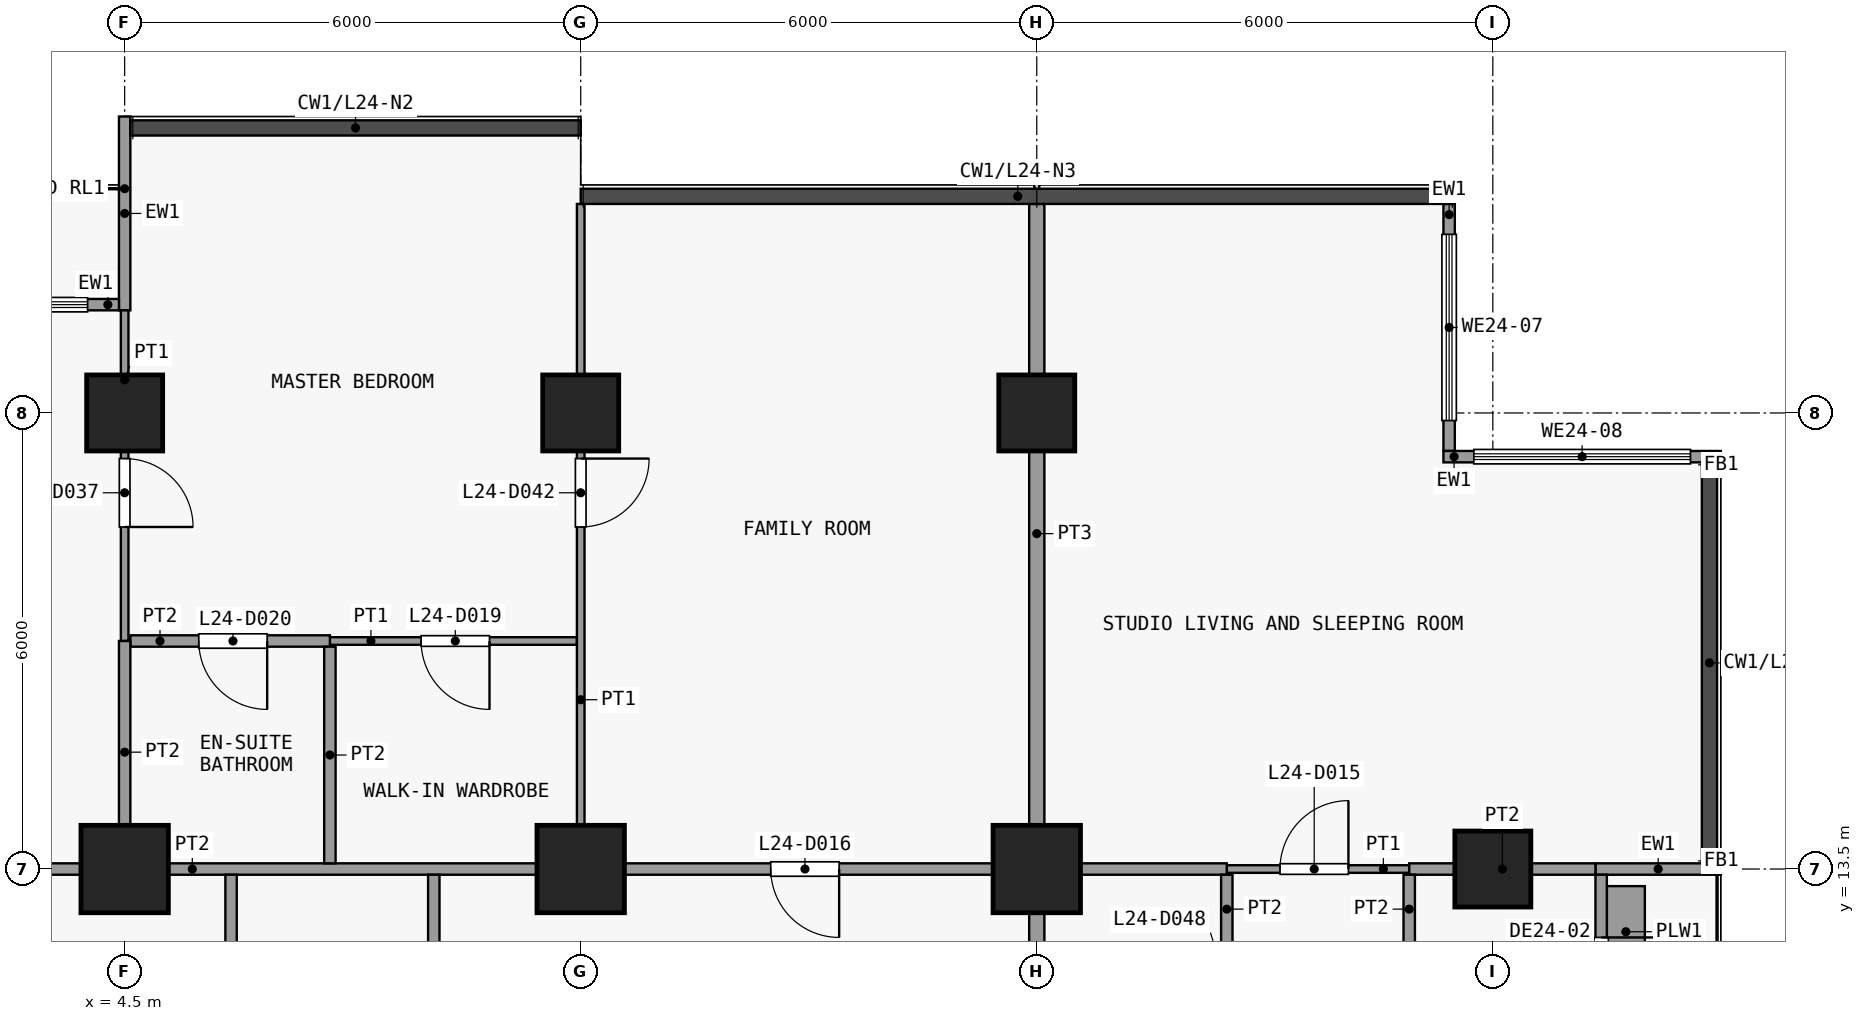
"""IFC4 building model, lengths in metres.
Left out: names, types, materials, properties, quantities, classifications, styles, units other than length and angle.
Written with IfcOpenShell. Run it as: python <this file> out.ifc"""

import sys

from ifc_helpers import new_model, si_unit, direction, frame, frame_2d, origin, origin_2d, place, context, subcontext, project, spatial, rectangle, extrude, element, fill, save


model = new_model("IFC4")
c1 = context("Model", 3, precision=1e-05, world=origin(), true_north=direction((0.0, 1.0)))
c2 = subcontext(c1, "Body", "Model", "MODEL_VIEW")
j1 = project(units=[si_unit("LENGTHUNIT", "METRE"), si_unit("PLANEANGLEUNIT", "RADIAN")], contexts=[c1])
p1 = place(None, origin())
s1 = spatial("IfcSite", under=j1, at=p1, CompositionType="ELEMENT")
p2 = place(p1, origin())
s2 = spatial("IfcBuilding", under=s1, at=p2, CompositionType="ELEMENT")
p3 = place(p2, frame((0.0, 0.0, 99.1)))
s3 = spatial("IfcBuildingStorey", under=s2, at=p3, CompositionType="ELEMENT", Elevation=99.1)
p4 = place(p3, frame((4.5, 13.5, 0.0), z_axis=(0.0, 0.0, 1.0), x_axis=(1.0, 0.0, 0.0)))
e1 = element("IfcColumn", 1, at=p4, inside=s3, PredefinedType="COLUMN", context=c2, shape_type="SweptSolid", body=[
    extrude(rectangle(XDim=1.15, YDim=1.15, at=origin_2d()), origin(), (0.0, 0.0, 1.0), 3.6),
])
p5 = place(p3, frame((4.5, 19.5, 0.0), z_axis=(0.0, 0.0, 1.0), x_axis=(1.0, 0.0, 0.0)))
e2 = element("IfcColumn", 2, at=p5, inside=s3, PredefinedType="COLUMN", context=c2, shape_type="SweptSolid", body=[
    extrude(rectangle(XDim=1.0, YDim=1.0, at=origin_2d()), origin(), (0.0, 0.0, 1.0), 3.6),
])
p6 = place(p3, frame((10.5, 13.5, 0.0), z_axis=(0.0, 0.0, 1.0), x_axis=(1.0, 0.0, 0.0)))
e3 = element("IfcColumn", 3, at=p6, inside=s3, PredefinedType="COLUMN", context=c2, shape_type="SweptSolid", body=[
    extrude(rectangle(XDim=1.15, YDim=1.15, at=origin_2d()), origin(), (0.0, 0.0, 1.0), 3.6),
])
p7 = place(p3, frame((10.5, 19.5, 0.0), z_axis=(0.0, 0.0, 1.0), x_axis=(1.0, 0.0, 0.0)))
e4 = element("IfcColumn", 4, at=p7, inside=s3, PredefinedType="COLUMN", context=c2, shape_type="SweptSolid", body=[
    extrude(rectangle(XDim=1.0, YDim=1.0, at=origin_2d()), origin(), (0.0, 0.0, 1.0), 3.6),
])
p8 = place(p3, frame((16.5, 13.5, 0.0), z_axis=(0.0, 0.0, 1.0), x_axis=(1.0, 0.0, 0.0)))
e5 = element("IfcColumn", 5, at=p8, inside=s3, PredefinedType="COLUMN", context=c2, shape_type="SweptSolid", body=[
    extrude(rectangle(XDim=1.15, YDim=1.15, at=origin_2d()), origin(), (0.0, 0.0, 1.0), 3.6),
])
for number, where, z_axis, x_axis in (
    (6, (16.5, 19.5, 0.0), (0.0, 0.0, 1.0), (1.0, 0.0, 0.0)),
    (7, (22.5, 13.5, 0.0), (0.0, 0.0, 1.0), (1.0, 0.0, 0.0)),
):
    element("IfcColumn", number, at=place(p3, frame(where, z_axis=z_axis, x_axis=x_axis)), inside=s3, PredefinedType="COLUMN", context=c2, shape_type="SweptSolid", body=[
        extrude(rectangle(XDim=1.0, YDim=1.0, at=origin_2d()), origin(), (0.0, 0.0, 1.0), 3.6),
    ])
p9 = place(p3, frame((21.925, 22.25, 0.0), z_axis=(0.0, 0.0, 1.0), x_axis=(0.0, -1.0, 0.0)))
e8 = element("IfcWall", 8, at=p9, inside=s3, PredefinedType="SOLIDWALL", context=c2, shape_type="SweptSolid", body=[
    extrude(rectangle(XDim=3.25, YDim=0.15, at=frame_2d((1.625, 0.0))), origin(), (0.0, 0.0, 1.0), 3.3),
])
p10 = place(p9, frame((0.4, 0.0, 0.9)))
e9 = element("IfcOpeningElement", 9, at=p10, cuts=e8, PredefinedType="OPENING", context=c2, shape_type="SweptSolid", body=[
    extrude(rectangle(XDim=2.45, YDim=2.4, at=frame_2d((1.225, 1.2))), frame((0.0, 0.085, 0.0), z_axis=(0.0, -1.0, 0.0), x_axis=(1.0, 0.0, 0.0)), (0.0, 0.0, 1.0), 0.17),
])
p11 = place(p3, frame((21.85, 18.925, 0.0), z_axis=(0.0, 0.0, 1.0), x_axis=(1.0, 0.0, 0.0)))
e10 = element("IfcWall", 10, at=p11, inside=s3, PredefinedType="SOLIDWALL", context=c2, shape_type="SweptSolid", body=[
    extrude(rectangle(XDim=3.65, YDim=0.15, at=frame_2d((1.825, 0.0))), origin(), (0.0, 0.0, 1.0), 3.3),
])
p12 = place(p11, frame((0.4, 0.0, 0.9)))
e11 = element("IfcOpeningElement", 11, at=p12, cuts=e10, PredefinedType="OPENING", context=c2, shape_type="SweptSolid", body=[
    extrude(rectangle(XDim=2.85, YDim=2.4, at=frame_2d((1.425, 1.2))), frame((0.0, 0.085, 0.0), z_axis=(0.0, -1.0, 0.0), x_axis=(1.0, 0.0, 0.0)), (0.0, 0.0, 1.0), 0.17),
])
p13 = place(p3, frame((4.5, 20.85, 0.0), z_axis=(0.0, 0.0, 1.0), x_axis=(0.0, 1.0, 0.0)))
e12 = element("IfcWall", 12, at=p13, inside=s3, PredefinedType="SOLIDWALL", context=c2, shape_type="SweptSolid", body=[
    extrude(rectangle(XDim=2.55, YDim=0.15, at=frame_2d((1.275, 0.0))), origin(), (0.0, 0.0, 1.0), 3.3),
])
p14 = place(p3, frame((-4.425, 20.925, 0.0), z_axis=(0.0, 0.0, 1.0), x_axis=(1.0, 0.0, 0.0)))
e13 = element("IfcWall", 13, at=p14, inside=s3, PredefinedType="SOLIDWALL", context=c2, shape_type="SweptSolid", body=[
    extrude(rectangle(XDim=8.85, YDim=0.15, at=frame_2d((4.425, 0.0))), origin(), (0.0, 0.0, 1.0), 3.3),
])
p15 = place(p14, frame((3.825, 0.0, 0.0)))
e14 = element("IfcOpeningElement", 14, at=p15, cuts=e13, PredefinedType="OPENING", context=c2, shape_type="SweptSolid", body=[
    extrude(rectangle(XDim=1.2, YDim=2.4, at=frame_2d((0.6, 1.2))), frame((0.0, 0.085, 0.0), z_axis=(0.0, -1.0, 0.0), x_axis=(1.0, 0.0, 0.0)), (0.0, 0.0, 1.0), 0.17),
])
p16 = place(p14, frame((0.413, 0.0, 0.9)))
e15 = element("IfcOpeningElement", 15, at=p16, cuts=e13, PredefinedType="OPENING", context=c2, shape_type="SweptSolid", body=[
    extrude(rectangle(XDim=3.0, YDim=2.1, at=frame_2d((1.5, 1.05))), frame((0.0, 0.085, 0.0), z_axis=(0.0, -1.0, 0.0), x_axis=(1.0, 0.0, 0.0)), (0.0, 0.0, 1.0), 0.17),
])
p17 = place(p14, frame((5.438, 0.0, 0.9)))
e16 = element("IfcOpeningElement", 16, at=p17, cuts=e13, PredefinedType="OPENING", context=c2, shape_type="SweptSolid", body=[
    extrude(rectangle(XDim=3.0, YDim=2.1, at=frame_2d((1.5, 1.05))), frame((0.0, 0.085, 0.0), z_axis=(0.0, -1.0, 0.0), x_axis=(1.0, 0.0, 0.0)), (0.0, 0.0, 1.0), 0.17),
])
p18 = place(p3, frame((23.85, 13.5, 0.0), z_axis=(0.0, 0.0, 1.0), x_axis=(1.0, 0.0, 0.0)))
e17 = element("IfcWall", 17, at=p18, inside=s3, PredefinedType="SOLIDWALL", context=c2, shape_type="SweptSolid", body=[
    extrude(rectangle(XDim=1.65, YDim=0.15, at=frame_2d((0.825, 0.0))), origin(), (0.0, 0.0, 1.0), 3.3),
])
p19 = place(p3, frame((23.925, 13.425, 0.0), z_axis=(0.0, 0.0, 1.0), x_axis=(0.0, -1.0, 0.0)))
e18 = element("IfcWall", 18, at=p19, inside=s3, PredefinedType="SOLIDWALL", context=c2, shape_type="SweptSolid", body=[
    extrude(rectangle(XDim=5.85, YDim=0.15, at=frame_2d((2.925, 0.0))), origin(), (0.0, 0.0, 1.0), 3.3),
])
p20 = place(p19, frame((0.825, 0.0, 0.0)))
e19 = element("IfcOpeningElement", 19, at=p20, cuts=e18, PredefinedType="OPENING", context=c2, shape_type="SweptSolid", body=[
    extrude(rectangle(XDim=1.2, YDim=2.4, at=frame_2d((0.6, 1.2))), frame((0.0, 0.085, 0.0), z_axis=(0.0, -1.0, 0.0), x_axis=(1.0, 0.0, 0.0)), (0.0, 0.0, 1.0), 0.17),
])
p21 = place(p19, frame((3.038, 0.0, 0.9)))
e20 = element("IfcOpeningElement", 20, at=p21, cuts=e18, PredefinedType="OPENING", context=c2, shape_type="SweptSolid", body=[
    extrude(rectangle(XDim=1.8, YDim=2.1, at=frame_2d((0.9, 1.05))), frame((0.0, 0.085, 0.0), z_axis=(0.0, -1.0, 0.0), x_axis=(1.0, 0.0, 0.0)), (0.0, 0.0, 1.0), 0.17),
])
p22 = place(p3, frame((24.25, 12.075, 0.0), z_axis=(0.0, 0.0, 1.0), x_axis=(0.0, 1.0, 0.0)))
e21 = element("IfcWall", 21, at=p22, inside=s3, PredefinedType="USERDEFINED", context=c2, shape_type="SweptSolid", body=[
    extrude(rectangle(XDim=1.2, YDim=0.5, at=frame_2d((0.6, 0.0))), origin(), (0.0, 0.0, 1.0), 0.9),
])
p23 = place(p3, frame((19.0, 13.5, 0.0), z_axis=(0.0, 0.0, 1.0), x_axis=(1.0, 0.0, 0.0)))
e22 = element("IfcWall", 22, at=p23, inside=s3, PredefinedType="PARTITIONING", context=c2, shape_type="SweptSolid", body=[
    extrude(rectangle(XDim=2.4, YDim=0.1, at=frame_2d((1.2, 0.0))), origin(), (0.0, 0.0, 1.0), 3.3),
])
p24 = place(p23, frame((0.7, 0.0, 0.0)))
e23 = element("IfcOpeningElement", 23, at=p24, cuts=e22, PredefinedType="OPENING", context=c2, shape_type="SweptSolid", body=[
    extrude(rectangle(XDim=0.9, YDim=2.1, at=frame_2d((0.45, 1.05))), frame((0.0, 0.06, 0.0), z_axis=(0.0, -1.0, 0.0), x_axis=(1.0, 0.0, 0.0)), (0.0, 0.0, 1.0), 0.12),
])
p25 = place(p3, frame((-2.1, 13.5, 0.0), z_axis=(0.0, 0.0, 1.0), x_axis=(1.0, 0.0, 0.0)))
e24 = element("IfcWall", 24, at=p25, inside=s3, PredefinedType="PARTITIONING", context=c2, shape_type="SweptSolid", body=[
    extrude(rectangle(XDim=21.1, YDim=0.15, at=frame_2d((10.55, 0.0))), origin(), (0.0, 0.0, 1.0), 3.3),
])
p26 = place(p25, frame((15.1, 0.0, 0.0)))
e25 = element("IfcOpeningElement", 25, at=p26, cuts=e24, PredefinedType="OPENING", context=c2, shape_type="SweptSolid", body=[
    extrude(rectangle(XDim=0.9, YDim=2.1, at=frame_2d((0.45, 1.05))), frame((0.0, 0.085, 0.0), z_axis=(0.0, -1.0, 0.0), x_axis=(1.0, 0.0, 0.0)), (0.0, 0.0, 1.0), 0.17),
])
p27 = place(p3, frame((21.4, 13.5, 0.0), z_axis=(0.0, 0.0, 1.0), x_axis=(1.0, 0.0, 0.0)))
e26 = element("IfcWall", 26, at=p27, inside=s3, PredefinedType="PARTITIONING", context=c2, shape_type="SweptSolid", body=[
    extrude(rectangle(XDim=2.45, YDim=0.15, at=frame_2d((1.225, 0.0))), origin(), (0.0, 0.0, 1.0), 3.3),
])
p28 = place(p3, frame((7.2, 16.5, 0.0), z_axis=(0.0, 0.0, 1.0), x_axis=(1.0, 0.0, 0.0)))
e27 = element("IfcWall", 27, at=p28, inside=s3, PredefinedType="PARTITIONING", context=c2, shape_type="SweptSolid", body=[
    extrude(rectangle(XDim=3.25, YDim=0.1, at=frame_2d((1.625, 0.0))), origin(), (0.0, 0.0, 1.0), 3.3),
])
p29 = place(p28, frame((1.2, 0.0, 0.0)))
e28 = element("IfcOpeningElement", 28, at=p29, cuts=e27, PredefinedType="OPENING", context=c2, shape_type="SweptSolid", body=[
    extrude(rectangle(XDim=0.9, YDim=2.1, at=frame_2d((0.45, 1.05))), frame((0.0, 0.06, 0.0), z_axis=(0.0, -1.0, 0.0), x_axis=(1.0, 0.0, 0.0)), (0.0, 0.0, 1.0), 0.12),
])
p30 = place(p3, frame((4.575, 16.5, 0.0), z_axis=(0.0, 0.0, 1.0), x_axis=(1.0, 0.0, 0.0)))
e29 = element("IfcWall", 29, at=p30, inside=s3, PredefinedType="PARTITIONING", context=c2, shape_type="SweptSolid", body=[
    extrude(rectangle(XDim=2.625, YDim=0.15, at=frame_2d((1.312, 0.0))), origin(), (0.0, 0.0, 1.0), 3.3),
])
p31 = place(p30, frame((0.9, 0.0, 0.0)))
e30 = element("IfcOpeningElement", 30, at=p31, cuts=e29, PredefinedType="OPENING", context=c2, shape_type="SweptSolid", body=[
    extrude(rectangle(XDim=0.9, YDim=2.1, at=frame_2d((0.45, 1.05))), frame((0.0, 0.085, 0.0), z_axis=(0.0, -1.0, 0.0), x_axis=(1.0, 0.0, 0.0)), (0.0, 0.0, 1.0), 0.17),
])
p32 = place(p3, frame((4.5, 16.5, 0.0), z_axis=(0.0, 0.0, 1.0), x_axis=(0.0, 1.0, 0.0)))
e31 = element("IfcWall", 31, at=p32, inside=s3, PredefinedType="PARTITIONING", context=c2, shape_type="SweptSolid", body=[
    extrude(rectangle(XDim=4.35, YDim=0.1, at=frame_2d((2.175, 0.0))), origin(), (0.0, 0.0, 1.0), 3.3),
])
p33 = place(p32, frame((1.5, 0.0, 0.0)))
e32 = element("IfcOpeningElement", 32, at=p33, cuts=e31, PredefinedType="OPENING", context=c2, shape_type="SweptSolid", body=[
    extrude(rectangle(XDim=0.9, YDim=2.1, at=frame_2d((0.45, 1.05))), frame((0.0, 0.06, 0.0), z_axis=(0.0, -1.0, 0.0), x_axis=(1.0, 0.0, 0.0)), (0.0, 0.0, 1.0), 0.12),
])
p34 = place(p3, frame((4.5, 13.575, 0.0), z_axis=(0.0, 0.0, 1.0), x_axis=(0.0, 1.0, 0.0)))
e33 = element("IfcWall", 33, at=p34, inside=s3, PredefinedType="PARTITIONING", context=c2, shape_type="SweptSolid", body=[
    extrude(rectangle(XDim=2.925, YDim=0.15, at=frame_2d((1.462, 0.0))), origin(), (0.0, 0.0, 1.0), 3.3),
])
p35 = place(p3, frame((5.9, 10.6, 0.0), z_axis=(0.0, 0.0, 1.0), x_axis=(0.0, 1.0, 0.0)))
e34 = element("IfcWall", 34, at=p35, inside=s3, PredefinedType="PARTITIONING", context=c2, shape_type="SweptSolid", body=[
    extrude(rectangle(XDim=2.825, YDim=0.15, at=frame_2d((1.413, 0.0))), origin(), (0.0, 0.0, 1.0), 3.3),
])
p36 = place(p35, frame((1.0, 0.0, 0.0)))
e35 = element("IfcOpeningElement", 35, at=p36, cuts=e34, PredefinedType="OPENING", context=c2, shape_type="SweptSolid", body=[
    extrude(rectangle(XDim=0.9, YDim=2.1, at=frame_2d((0.45, 1.05))), frame((0.0, 0.085, 0.0), z_axis=(0.0, -1.0, 0.0), x_axis=(1.0, 0.0, 0.0)), (0.0, 0.0, 1.0), 0.17),
])
p37 = place(p3, frame((7.2, 13.575, 0.0), z_axis=(0.0, 0.0, 1.0), x_axis=(0.0, 1.0, 0.0)))
e36 = element("IfcWall", 36, at=p37, inside=s3, PredefinedType="PARTITIONING", context=c2, shape_type="SweptSolid", body=[
    extrude(rectangle(XDim=2.85, YDim=0.15, at=frame_2d((1.425, 0.0))), origin(), (0.0, 0.0, 1.0), 3.3),
])
p38 = place(p3, frame((8.567, 10.6, 0.0), z_axis=(0.0, 0.0, 1.0), x_axis=(0.0, 1.0, 0.0)))
e37 = element("IfcWall", 37, at=p38, inside=s3, PredefinedType="PARTITIONING", context=c2, shape_type="SweptSolid", body=[
    extrude(rectangle(XDim=2.825, YDim=0.15, at=frame_2d((1.413, 0.0))), origin(), (0.0, 0.0, 1.0), 3.3),
])
p39 = place(p3, frame((10.5, 13.575, 0.0), z_axis=(0.0, 0.0, 1.0), x_axis=(0.0, 1.0, 0.0)))
e38 = element("IfcWall", 38, at=p39, inside=s3, PredefinedType="PARTITIONING", context=c2, shape_type="SweptSolid", body=[
    extrude(rectangle(XDim=8.675, YDim=0.1, at=frame_2d((4.337, 0.0))), origin(), (0.0, 0.0, 1.0), 3.3),
])
p40 = place(p39, frame((4.425, 0.0, 0.0)))
e39 = element("IfcOpeningElement", 39, at=p40, cuts=e38, PredefinedType="OPENING", context=c2, shape_type="SweptSolid", body=[
    extrude(rectangle(XDim=0.9, YDim=2.1, at=frame_2d((0.45, 1.05))), frame((0.0, 0.06, 0.0), z_axis=(0.0, -1.0, 0.0), x_axis=(1.0, 0.0, 0.0)), (0.0, 0.0, 1.0), 0.12),
])
p41 = place(p3, frame((16.5, 10.6, 0.0), z_axis=(0.0, 0.0, 1.0), x_axis=(0.0, 1.0, 0.0)))
e40 = element("IfcWall", 40, at=p41, inside=s3, PredefinedType="PARTITIONING", context=c2, shape_type="SweptSolid", body=[
    extrude(rectangle(XDim=2.825, YDim=0.2, at=frame_2d((1.413, 0.0))), origin(), (0.0, 0.0, 1.0), 3.3),
])
p42 = place(p3, frame((16.5, 13.575, 0.0), z_axis=(0.0, 0.0, 1.0), x_axis=(0.0, 1.0, 0.0)))
e41 = element("IfcWall", 41, at=p42, inside=s3, PredefinedType="PARTITIONING", context=c2, shape_type="SweptSolid", body=[
    extrude(rectangle(XDim=8.675, YDim=0.2, at=frame_2d((4.337, 0.0))), origin(), (0.0, 0.0, 1.0), 3.3),
])
p43 = place(p3, frame((19.0, 10.6, 0.0), z_axis=(0.0, 0.0, 1.0), x_axis=(0.0, 1.0, 0.0)))
e42 = element("IfcWall", 42, at=p43, inside=s3, PredefinedType="PARTITIONING", context=c2, shape_type="SweptSolid", body=[
    extrude(rectangle(XDim=2.825, YDim=0.15, at=frame_2d((1.413, 0.0))), origin(), (0.0, 0.0, 1.0), 3.3),
])
p44 = place(p43, frame((0.9, 0.0, 0.0)))
e43 = element("IfcOpeningElement", 43, at=p44, cuts=e42, PredefinedType="OPENING", context=c2, shape_type="SweptSolid", body=[
    extrude(rectangle(XDim=0.9, YDim=2.1, at=frame_2d((0.45, 1.05))), frame((0.0, 0.085, 0.0), z_axis=(0.0, -1.0, 0.0), x_axis=(1.0, 0.0, 0.0)), (0.0, 0.0, 1.0), 0.17),
])
p45 = place(p3, frame((21.4, 10.6, 0.0), z_axis=(0.0, 0.0, 1.0), x_axis=(0.0, 1.0, 0.0)))
e44 = element("IfcWall", 44, at=p45, inside=s3, PredefinedType="PARTITIONING", context=c2, shape_type="SweptSolid", body=[
    extrude(rectangle(XDim=2.825, YDim=0.15, at=frame_2d((1.413, 0.0))), origin(), (0.0, 0.0, 1.0), 3.3),
])
p46 = place(p45, frame((0.9, 0.0, 0.0)))
e45 = element("IfcOpeningElement", 45, at=p46, cuts=e44, PredefinedType="OPENING", context=c2, shape_type="SweptSolid", body=[
    extrude(rectangle(XDim=0.9, YDim=2.1, at=frame_2d((0.45, 1.05))), frame((0.0, 0.085, 0.0), z_axis=(0.0, -1.0, 0.0), x_axis=(1.0, 0.0, 0.0)), (0.0, 0.0, 1.0), 0.17),
])
p47 = place(p10, origin())
e46 = element("IfcWindow", 46, at=p47, inside=s3, PartitioningType="SINGLE_PANEL", PredefinedType="WINDOW", context=c2, shape_type="SweptSolid", body=[
    extrude(rectangle(XDim=2.45, YDim=2.4, at=frame_2d((1.225, 1.2))), frame((0.0, 0.03, 0.0), z_axis=(0.0, -1.0, 0.0), x_axis=(1.0, 0.0, 0.0)), (0.0, 0.0, 1.0), 0.06),
])
fill(e9, e46)
p48 = place(p12, origin())
e47 = element("IfcWindow", 47, at=p48, inside=s3, PartitioningType="SINGLE_PANEL", PredefinedType="WINDOW", context=c2, shape_type="SweptSolid", body=[
    extrude(rectangle(XDim=2.85, YDim=2.4, at=frame_2d((1.425, 1.2))), frame((0.0, 0.03, 0.0), z_axis=(0.0, -1.0, 0.0), x_axis=(1.0, 0.0, 0.0)), (0.0, 0.0, 1.0), 0.06),
])
fill(e11, e47)
p49 = place(p17, origin())
e48 = element("IfcWindow", 48, at=p49, inside=s3, PartitioningType="SINGLE_PANEL", PredefinedType="WINDOW", context=c2, shape_type="SweptSolid", body=[
    extrude(rectangle(XDim=3.0, YDim=2.1, at=frame_2d((1.5, 1.05))), frame((0.0, 0.03, 0.0), z_axis=(0.0, -1.0, 0.0), x_axis=(1.0, 0.0, 0.0)), (0.0, 0.0, 1.0), 0.06),
])
fill(e16, e48)
p50 = place(p20, origin())
e49 = element("IfcDoor", 49, at=p50, inside=s3, OperationType="SINGLE_SWING_LEFT", PredefinedType="DOOR", context=c2, shape_type="SweptSolid", body=[
    extrude(rectangle(XDim=1.2, YDim=2.4, at=frame_2d((0.6, 1.2))), frame((0.0, 0.025, 0.0), z_axis=(0.0, -1.0, 0.0), x_axis=(1.0, 0.0, 0.0)), (0.0, 0.0, 1.0), 0.05),
])
fill(e19, e49)
p51 = place(p24, origin())
e50 = element("IfcDoor", 50, at=p51, inside=s3, OperationType="SINGLE_SWING_LEFT", PredefinedType="DOOR", context=c2, shape_type="SweptSolid", body=[
    extrude(rectangle(XDim=0.9, YDim=2.1, at=frame_2d((0.45, 1.05))), frame((0.0, 0.025, 0.0), z_axis=(0.0, -1.0, 0.0), x_axis=(1.0, 0.0, 0.0)), (0.0, 0.0, 1.0), 0.05),
])
fill(e23, e50)
p52 = place(p26, origin())
e51 = element("IfcDoor", 51, at=p52, inside=s3, OperationType="SINGLE_SWING_RIGHT", PredefinedType="DOOR", context=c2, shape_type="SweptSolid", body=[
    extrude(rectangle(XDim=0.9, YDim=2.1, at=frame_2d((0.45, 1.05))), frame((0.0, 0.025, 0.0), z_axis=(0.0, -1.0, 0.0), x_axis=(1.0, 0.0, 0.0)), (0.0, 0.0, 1.0), 0.05),
])
fill(e25, e51)
p53 = place(p29, origin())
e52 = element("IfcDoor", 52, at=p53, inside=s3, OperationType="SINGLE_SWING_RIGHT", PredefinedType="DOOR", context=c2, shape_type="SweptSolid", body=[
    extrude(rectangle(XDim=0.9, YDim=2.1, at=frame_2d((0.45, 1.05))), frame((0.0, 0.025, 0.0), z_axis=(0.0, -1.0, 0.0), x_axis=(1.0, 0.0, 0.0)), (0.0, 0.0, 1.0), 0.05),
])
fill(e28, e52)
p54 = place(p31, origin())
e53 = element("IfcDoor", 53, at=p54, inside=s3, OperationType="SINGLE_SWING_RIGHT", PredefinedType="DOOR", context=c2, shape_type="SweptSolid", body=[
    extrude(rectangle(XDim=0.9, YDim=2.1, at=frame_2d((0.45, 1.05))), frame((0.0, 0.025, 0.0), z_axis=(0.0, -1.0, 0.0), x_axis=(1.0, 0.0, 0.0)), (0.0, 0.0, 1.0), 0.05),
])
fill(e30, e53)
p55 = place(p33, origin())
e54 = element("IfcDoor", 54, at=p55, inside=s3, OperationType="SINGLE_SWING_LEFT", PredefinedType="DOOR", context=c2, shape_type="SweptSolid", body=[
    extrude(rectangle(XDim=0.9, YDim=2.1, at=frame_2d((0.45, 1.05))), frame((0.0, 0.025, 0.0), z_axis=(0.0, -1.0, 0.0), x_axis=(1.0, 0.0, 0.0)), (0.0, 0.0, 1.0), 0.05),
])
fill(e32, e54)
p56 = place(p40, origin())
e55 = element("IfcDoor", 55, at=p56, inside=s3, OperationType="SINGLE_SWING_RIGHT", PredefinedType="DOOR", context=c2, shape_type="SweptSolid", body=[
    extrude(rectangle(XDim=0.9, YDim=2.1, at=frame_2d((0.45, 1.05))), frame((0.0, 0.025, 0.0), z_axis=(0.0, -1.0, 0.0), x_axis=(1.0, 0.0, 0.0)), (0.0, 0.0, 1.0), 0.05),
])
fill(e39, e55)
save(model, sys.argv[1])
